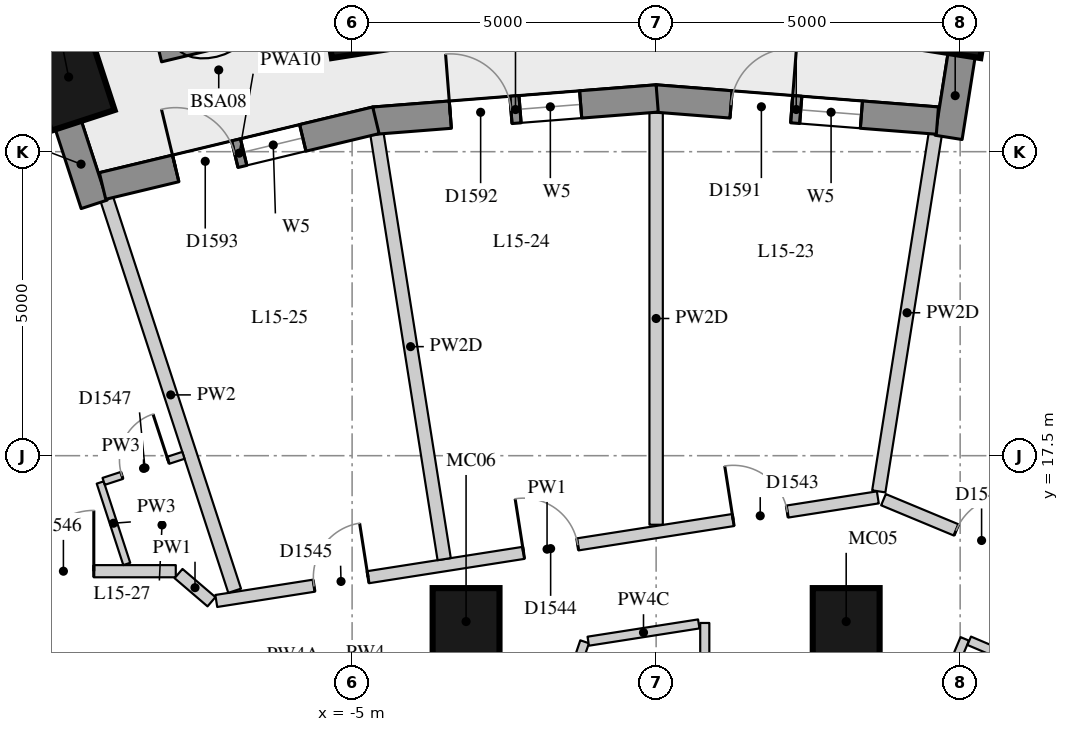
"""IFC4 building model, lengths in metres.
Left out: names, types, materials, properties, quantities, classifications, styles, units other than length and angle.
Written with IfcOpenShell. Run it as: python <this file> out.ifc"""

import sys

from ifc_helpers import new_model, si_unit, direction, frame, frame_2d, origin, origin_2d, place, context, subcontext, project, spatial, rectangle, extrude, element, fill, save


model = new_model("IFC4")
c1 = context("Model", 3, precision=1e-05, world=origin(), true_north=direction((0.0, 1.0)))
c2 = subcontext(c1, "Body", "Model", "MODEL_VIEW")
j1 = project(units=[si_unit("LENGTHUNIT", "METRE"), si_unit("PLANEANGLEUNIT", "RADIAN")], contexts=[c1])
p1 = place(None, origin())
s1 = spatial("IfcSite", under=j1, at=p1, CompositionType="ELEMENT")
p2 = place(p1, origin())
s2 = spatial("IfcBuilding", under=s1, at=p2, CompositionType="ELEMENT")
p3 = place(p2, frame((0.0, 0.0, 58.0)))
s3 = spatial("IfcBuildingStorey", under=s2, at=p3, CompositionType="ELEMENT", Elevation=58.0)
for number, where, z_axis, x_axis in (
    (1, (4.906, 24.866, 0.0), (0.0, 0.0, 1.0), (0.156, 0.988, 0.0)),
    (2, (-4.906, 24.866, 0.0), (0.0, 0.0, 1.0), (-0.156, 0.988, 0.0)),
    (3, (-9.662, 23.727, 0.0), (0.0, 0.0, 1.0), (-0.31, 0.951, 0.0)),
):
    element("IfcColumn", number, at=place(p3, frame(where, z_axis=z_axis, x_axis=x_axis)), inside=s3, PredefinedType="COLUMN", context=c2, shape_type="SweptSolid", body=[
        extrude(rectangle(XDim=1.5, YDim=1.1, at=origin_2d()), origin(), (0.0, 0.0, 1.0), 3.3),
    ])
for number, where, z_axis, x_axis in (
    (4, (3.126, 14.772, 0.0), (0.0, 0.0, 1.0), (1.0, 0.0, 0.0)),
    (5, (-3.126, 14.772, 0.0), (0.0, 0.0, 1.0), (1.0, 0.0, 0.0)),
):
    element("IfcColumn", number, at=place(p3, frame(where, z_axis=z_axis, x_axis=x_axis)), inside=s3, PredefinedType="COLUMN", context=c2, shape_type="SweptSolid", body=[
        extrude(rectangle(XDim=1.1, YDim=1.1, at=origin_2d()), origin(), (0.0, 0.0, 1.0), 3.3),
    ])
p4 = place(p3, frame((9.308, 24.35, 0.0), z_axis=(0.0, 0.0, 1.0), x_axis=(-0.972496561493, 0.232917233979, 0.0)))
e6 = element("IfcWall", 6, at=p4, inside=s3, PredefinedType="SOLIDWALL", context=c2, shape_type="SweptSolid", body=[
    extrude(rectangle(XDim=3.911, YDim=0.45, at=frame_2d((1.956, 0.0))), origin(), (0.0, 0.0, 1.0), 3.02),
])
p5 = place(p4, frame((0.855, 0.0, 0.4)))
e7 = element("IfcOpeningElement", 7, at=p5, cuts=e6, PredefinedType="OPENING", context=c2, shape_type="SweptSolid", body=[
    extrude(rectangle(XDim=2.2, YDim=1.75, at=frame_2d((1.1, 0.875))), frame((0.0, 0.235, 0.0), z_axis=(0.0, -1.0, 0.0), x_axis=(1.0, 0.0, 0.0)), (0.0, 0.0, 1.0), 0.47),
])
p6 = place(p3, frame((5.027, 24.108, 0.0), z_axis=(0.0, 0.0, 1.0), x_axis=(-0.156133927791, -0.98773589415, 0.0)))
e8 = element("IfcWall", 8, at=p6, inside=s3, PredefinedType="SOLIDWALL", context=c2, shape_type="SweptSolid", body=[
    extrude(rectangle(XDim=1.39, YDim=0.45, at=frame_2d((0.695, 0.0))), origin(), (0.0, 0.0, 1.0), 2.47),
])
p7 = place(p3, frame((-9.674, 22.956, 0.0), z_axis=(0.0, 0.0, 1.0), x_axis=(0.310269011655, -0.950648799719, 0.0)))
e9 = element("IfcWall", 9, at=p7, inside=s3, PredefinedType="SOLIDWALL", context=c2, shape_type="SweptSolid", body=[
    extrude(rectangle(XDim=1.39, YDim=0.45, at=frame_2d((0.695, 0.0))), origin(), (0.0, 0.0, 1.0), 3.02),
])
p8 = place(p3, frame((4.626, 23.011, 0.0), z_axis=(0.0, 0.0, 1.0), x_axis=(-0.996937095772, 0.078207589615, 0.0)))
e10 = element("IfcWall", 10, at=p8, inside=s3, PredefinedType="SOLIDWALL", context=c2, shape_type="SweptSolid", body=[
    extrude(rectangle(XDim=4.657, YDim=0.45, at=frame_2d((2.329, 0.0))), origin(), (0.0, 0.0, 1.0), 3.02),
])
p9 = place(p8, frame((1.254, 0.0, 0.4)))
e11 = element("IfcOpeningElement", 11, at=p9, cuts=e10, PredefinedType="OPENING", context=c2, shape_type="SweptSolid", body=[
    extrude(rectangle(XDim=1.0, YDim=1.75, at=frame_2d((0.5, 0.875))), frame((0.0, 0.235, 0.0), z_axis=(0.0, -1.0, 0.0), x_axis=(1.0, 0.0, 0.0)), (0.0, 0.0, 1.0), 0.47),
])
p10 = place(p8, frame((2.404, 0.0, 0.0)))
e12 = element("IfcOpeningElement", 12, at=p10, cuts=e10, PredefinedType="OPENING", context=c2, shape_type="SweptSolid", body=[
    extrude(rectangle(XDim=1.0, YDim=2.15, at=frame_2d((0.5, 1.075))), frame((0.0, 0.235, 0.0), z_axis=(0.0, -1.0, 0.0), x_axis=(1.0, 0.0, 0.0)), (0.0, 0.0, 1.0), 0.47),
])
p11 = place(p3, frame((0.018, 23.376, 0.0), z_axis=(0.0, 0.0, 1.0), x_axis=(-0.996935982964, -0.078221773648, 0.0)))
e13 = element("IfcWall", 13, at=p11, inside=s3, PredefinedType="SOLIDWALL", context=c2, shape_type="SweptSolid", body=[
    extrude(rectangle(XDim=4.676, YDim=0.45, at=frame_2d((2.338, 0.0))), origin(), (0.0, 0.0, 1.0), 3.02),
])
p12 = place(p11, frame((1.263, 0.0, 0.4)))
e14 = element("IfcOpeningElement", 14, at=p12, cuts=e13, PredefinedType="OPENING", context=c2, shape_type="SweptSolid", body=[
    extrude(rectangle(XDim=1.0, YDim=1.75, at=frame_2d((0.5, 0.875))), frame((0.0, 0.235, 0.0), z_axis=(0.0, -1.0, 0.0), x_axis=(1.0, 0.0, 0.0)), (0.0, 0.0, 1.0), 0.47),
])
p13 = place(p11, frame((2.413, 0.0, 0.0)))
e15 = element("IfcOpeningElement", 15, at=p13, cuts=e13, PredefinedType="OPENING", context=c2, shape_type="SweptSolid", body=[
    extrude(rectangle(XDim=1.0, YDim=2.15, at=frame_2d((0.5, 1.075))), frame((0.0, 0.235, 0.0), z_axis=(0.0, -1.0, 0.0), x_axis=(1.0, 0.0, 0.0)), (0.0, 0.0, 1.0), 0.47),
])
p14 = place(p3, frame((-4.608, 23.016, 0.0), z_axis=(0.0, 0.0, 1.0), x_axis=(-0.972343667289, -0.233554688847, 0.0)))
e16 = element("IfcWall", 16, at=p14, inside=s3, PredefinedType="SOLIDWALL", context=c2, shape_type="SweptSolid", body=[
    extrude(rectangle(XDim=4.624, YDim=0.45, at=frame_2d((2.312, 0.0))), origin(), (0.0, 0.0, 1.0), 3.02),
])
p15 = place(p14, frame((1.237, 0.0, 0.4)))
e17 = element("IfcOpeningElement", 17, at=p15, cuts=e16, PredefinedType="OPENING", context=c2, shape_type="SweptSolid", body=[
    extrude(rectangle(XDim=1.0, YDim=1.75, at=frame_2d((0.5, 0.875))), frame((0.0, 0.235, 0.0), z_axis=(0.0, -1.0, 0.0), x_axis=(1.0, 0.0, 0.0)), (0.0, 0.0, 1.0), 0.47),
])
p16 = place(p14, frame((2.387, 0.0, 0.0)))
e18 = element("IfcOpeningElement", 18, at=p16, cuts=e16, PredefinedType="OPENING", context=c2, shape_type="SweptSolid", body=[
    extrude(rectangle(XDim=1.0, YDim=2.15, at=frame_2d((0.5, 1.075))), frame((0.0, 0.235, 0.0), z_axis=(0.0, -1.0, 0.0), x_axis=(1.0, 0.0, 0.0)), (0.0, 0.0, 1.0), 0.47),
])
p17 = place(p3, frame((-6.465, 24.737, 0.0), z_axis=(0.0, 0.0, 1.0), x_axis=(-0.972504142103, -0.232885580473, 0.0)))
e19 = element("IfcWall", 19, at=p17, inside=s3, PredefinedType="USERDEFINED", context=c2, shape_type="SweptSolid", body=[
    extrude(rectangle(XDim=1.8, YDim=0.7, at=frame_2d((0.9, 0.0))), origin(), (0.0, 0.0, 1.0), 0.75),
])
p18 = place(p3, frame((-15.531, 15.6, 0.0), z_axis=(0.0, 0.0, 1.0), x_axis=(1.0, 0.0, 0.0)))
e20 = element("IfcWall", 20, at=p18, inside=s3, PredefinedType="PARTITIONING", context=c2, shape_type="SweptSolid", body=[
    extrude(rectangle(XDim=7.632, YDim=0.2, at=frame_2d((3.816, 0.0))), origin(), (0.0, 0.0, 1.0), 3.02),
])
p19 = place(p18, frame((5.283, 0.0, 0.0)))
e21 = element("IfcOpeningElement", 21, at=p19, cuts=e20, PredefinedType="OPENING", context=c2, shape_type="SweptSolid", body=[
    extrude(rectangle(XDim=1.0, YDim=2.1, at=frame_2d((0.5, 1.05))), frame((0.0, 0.11, 0.0), z_axis=(0.0, -1.0, 0.0), x_axis=(1.0, 0.0, 0.0)), (0.0, 0.0, 1.0), 0.22),
])
p20 = place(p18, frame((0.451, 0.0, 0.0)))
e22 = element("IfcOpeningElement", 22, at=p20, cuts=e20, PredefinedType="OPENING", context=c2, shape_type="SweptSolid", body=[
    extrude(rectangle(XDim=1.1, YDim=2.1, at=frame_2d((0.55, 1.05))), frame((0.0, 0.11, 0.0), z_axis=(0.0, -1.0, 0.0), x_axis=(1.0, 0.0, 0.0)), (0.0, 0.0, 1.0), 0.22),
])
p21 = place(p3, frame((-7.854, 15.561, 0.0), z_axis=(0.0, 0.0, 1.0), x_axis=(0.759763914627, -0.650199041856, 0.0)))
e23 = element("IfcWall", 23, at=p21, inside=s3, PredefinedType="PARTITIONING", context=c2, shape_type="SweptSolid", body=[
    extrude(rectangle(XDim=0.713, YDim=0.2, at=frame_2d((0.356, 0.0))), origin(), (0.0, 0.0, 1.0), 3.02),
])
p22 = place(p3, frame((-7.234, 15.11, 0.0), z_axis=(0.0, 0.0, 1.0), x_axis=(0.987957763282, 0.154723811906, 0.0)))
e24 = element("IfcWall", 24, at=p22, inside=s3, PredefinedType="PARTITIONING", context=c2, shape_type="SweptSolid", body=[
    extrude(rectangle(XDim=11.012, YDim=0.2, at=frame_2d((5.506, 0.0))), origin(), (0.0, 0.0, 1.0), 3.02),
])
p23 = place(p22, frame((8.605, 0.0, 0.0)))
e25 = element("IfcOpeningElement", 25, at=p23, cuts=e24, PredefinedType="OPENING", context=c2, shape_type="SweptSolid", body=[
    extrude(rectangle(XDim=0.9, YDim=2.1, at=frame_2d((0.45, 1.05))), frame((0.0, 0.11, 0.0), z_axis=(0.0, -1.0, 0.0), x_axis=(1.0, 0.0, 0.0)), (0.0, 0.0, 1.0), 0.22),
])
p24 = place(p22, frame((5.116, 0.0, 0.0)))
e26 = element("IfcOpeningElement", 26, at=p24, cuts=e24, PredefinedType="OPENING", context=c2, shape_type="SweptSolid", body=[
    extrude(rectangle(XDim=0.9, YDim=2.1, at=frame_2d((0.45, 1.05))), frame((0.0, 0.11, 0.0), z_axis=(0.0, -1.0, 0.0), x_axis=(1.0, 0.0, 0.0)), (0.0, 0.0, 1.0), 0.22),
])
p25 = place(p22, frame((1.626, 0.0, 0.0)))
e27 = element("IfcOpeningElement", 27, at=p25, cuts=e24, PredefinedType="OPENING", context=c2, shape_type="SweptSolid", body=[
    extrude(rectangle(XDim=0.9, YDim=2.1, at=frame_2d((0.45, 1.05))), frame((0.0, 0.11, 0.0), z_axis=(0.0, -1.0, 0.0), x_axis=(1.0, 0.0, 0.0)), (0.0, 0.0, 1.0), 0.22),
])
p26 = place(p3, frame((3.739, 16.776, 0.0), z_axis=(0.0, 0.0, 1.0), x_axis=(0.923364778497, -0.383923802117, 0.0)))
e28 = element("IfcWall", 28, at=p26, inside=s3, PredefinedType="PARTITIONING", context=c2, shape_type="SweptSolid", body=[
    extrude(rectangle(XDim=8.273, YDim=0.2, at=frame_2d((4.137, 0.0))), origin(), (0.0, 0.0, 1.0), 3.02),
])
p27 = place(p26, frame((6.153, 0.0, 0.0)))
e29 = element("IfcOpeningElement", 29, at=p27, cuts=e28, PredefinedType="OPENING", context=c2, shape_type="SweptSolid", body=[
    extrude(rectangle(XDim=1.1, YDim=2.1, at=frame_2d((0.55, 1.05))), frame((0.0, 0.11, 0.0), z_axis=(0.0, -1.0, 0.0), x_axis=(1.0, 0.0, 0.0)), (0.0, 0.0, 1.0), 0.22),
])
p28 = place(p26, frame((1.298, 0.0, 0.0)))
e30 = element("IfcOpeningElement", 30, at=p28, cuts=e28, PredefinedType="OPENING", context=c2, shape_type="SweptSolid", body=[
    extrude(rectangle(XDim=0.9, YDim=2.1, at=frame_2d((0.45, 1.05))), frame((0.0, 0.11, 0.0), z_axis=(0.0, -1.0, 0.0), x_axis=(1.0, 0.0, 0.0)), (0.0, 0.0, 1.0), 0.22),
])
p29 = place(p3, frame((0.8, 14.749, 0.0), z_axis=(0.0, 0.0, 1.0), x_axis=(0.0, -1.0, 0.0)))
e31 = element("IfcWall", 31, at=p29, inside=s3, PredefinedType="PARTITIONING", context=c2, shape_type="SweptSolid", body=[
    extrude(rectangle(XDim=5.599, YDim=0.15, at=frame_2d((2.799, 0.0))), origin(), (0.0, 0.0, 1.0), 3.02),
])
p30 = place(p3, frame((-1.567, 13.289, 0.0), z_axis=(0.0, 0.0, 1.0), x_axis=(0.321769415776, 0.946818062286, 0.0)))
e32 = element("IfcWall", 32, at=p30, inside=s3, PredefinedType="PARTITIONING", context=c2, shape_type="SweptSolid", body=[
    extrude(rectangle(XDim=1.215, YDim=0.15, at=frame_2d((0.607, 0.0))), origin(), (0.0, 0.0, 1.0), 3.02),
])
p31 = place(p3, frame((-1.116, 14.449, 0.0), z_axis=(0.0, 0.0, 1.0), x_axis=(0.988017726025, 0.154340445315, 0.0)))
e33 = element("IfcWall", 33, at=p31, inside=s3, PredefinedType="PARTITIONING", context=c2, shape_type="SweptSolid", body=[
    extrude(rectangle(XDim=1.84, YDim=0.15, at=frame_2d((0.92, 0.0))), origin(), (0.0, 0.0, 1.0), 2.42),
])
p32 = place(p3, frame((4.337, 12.724, 0.0), z_axis=(0.0, 0.0, 1.0), x_axis=(0.386537433901, 0.922273718694, 0.0)))
e34 = element("IfcWall", 34, at=p32, inside=s3, PredefinedType="PARTITIONING", context=c2, shape_type="SweptSolid", body=[
    extrude(rectangle(XDim=1.911, YDim=0.15, at=frame_2d((0.956, 0.0))), origin(), (0.0, 0.0, 1.0), 3.02),
])
p33 = place(p3, frame((5.149, 14.456, 0.0), z_axis=(0.0, 0.0, 1.0), x_axis=(0.920541383735, -0.390645057348, 0.0)))
e35 = element("IfcWall", 35, at=p33, inside=s3, PredefinedType="PARTITIONING", context=c2, shape_type="SweptSolid", body=[
    extrude(rectangle(XDim=6.124, YDim=0.15, at=frame_2d((3.062, 0.0))), origin(), (0.0, 0.0, 1.0), 3.02),
])
p34 = place(p33, frame((2.508, 0.0, 0.0)))
e36 = element("IfcOpeningElement", 36, at=p34, cuts=e35, PredefinedType="OPENING", context=c2, shape_type="SweptSolid", body=[
    extrude(rectangle(XDim=0.9, YDim=2.1, at=frame_2d((0.45, 1.05))), frame((0.0, 0.085, 0.0), z_axis=(0.0, -1.0, 0.0), x_axis=(1.0, 0.0, 0.0)), (0.0, 0.0, 1.0), 0.17),
])
p35 = place(p3, frame((4.591, 22.789, 0.0), z_axis=(0.0, 0.0, 1.0), x_axis=(-0.156126964527, -0.987736994826, 0.0)))
e37 = element("IfcWall", 37, at=p35, inside=s3, PredefinedType="PARTITIONING", context=c2, shape_type="SweptSolid", body=[
    extrude(rectangle(XDim=5.948, YDim=0.22, at=frame_2d((2.974, 0.0))), origin(), (0.0, 0.0, 1.0), 2.47),
])
p36 = place(p3, frame((0.0, 23.149, 0.0), z_axis=(0.0, 0.0, 1.0), x_axis=(0.0, -1.0, 0.0)))
e38 = element("IfcWall", 38, at=p36, inside=s3, PredefinedType="PARTITIONING", context=c2, shape_type="SweptSolid", body=[
    extrude(rectangle(XDim=6.784, YDim=0.22, at=frame_2d((3.392, 0.0))), origin(), (0.0, 0.0, 1.0), 2.47),
])
p37 = place(p3, frame((-4.591, 22.789, 0.0), z_axis=(0.0, 0.0, 1.0), x_axis=(0.15613617795, -0.987735538459, 0.0)))
e39 = element("IfcWall", 39, at=p37, inside=s3, PredefinedType="PARTITIONING", context=c2, shape_type="SweptSolid", body=[
    extrude(rectangle(XDim=7.077, YDim=0.22, at=frame_2d((3.539, 0.0))), origin(), (0.0, 0.0, 1.0), 2.47),
])
p38 = place(p3, frame((-9.034, 21.721, 0.0), z_axis=(0.0, 0.0, 1.0), x_axis=(0.310212430052, -0.950667264736, 0.0)))
e40 = element("IfcWall", 40, at=p38, inside=s3, PredefinedType="PARTITIONING", context=c2, shape_type="SweptSolid", body=[
    extrude(rectangle(XDim=6.777, YDim=0.22, at=frame_2d((3.388, 0.0))), origin(), (0.0, 0.0, 1.0), 3.02),
])
p39 = place(p3, frame((-8.706, 15.719, 0.0), z_axis=(0.0, 0.0, 1.0), x_axis=(-0.310245242974, 0.950656556918, 0.0)))
e41 = element("IfcWall", 41, at=p39, inside=s3, PredefinedType="PARTITIONING", context=c2, shape_type="SweptSolid", body=[
    extrude(rectangle(XDim=1.409, YDim=0.12, at=frame_2d((0.705, 0.0))), origin(), (0.0, 0.0, 1.0), 3.02),
])
p40 = place(p3, frame((-9.086, 17.077, 0.0), z_axis=(0.0, 0.0, 1.0), x_axis=(0.950576687533, 0.310489872812, 0.0)))
e42 = element("IfcWall", 42, at=p40, inside=s3, PredefinedType="PARTITIONING", context=c2, shape_type="SweptSolid", body=[
    extrude(rectangle(XDim=1.38, YDim=0.12, at=frame_2d((0.69, 0.0))), origin(), (0.0, 0.0, 1.0), 3.02),
])
p41 = place(p40, frame((0.315, 0.0, 0.0)))
e43 = element("IfcOpeningElement", 43, at=p41, cuts=e42, PredefinedType="OPENING", context=c2, shape_type="SweptSolid", body=[
    extrude(rectangle(XDim=0.8, YDim=2.1, at=frame_2d((0.4, 1.05))), frame((0.0, 0.07, 0.0), z_axis=(0.0, -1.0, 0.0), x_axis=(1.0, 0.0, 0.0)), (0.0, 0.0, 1.0), 0.14),
])
p42 = place(p9, origin())
e44 = element("IfcWindow", 44, at=p42, inside=s3, PartitioningType="SINGLE_PANEL", PredefinedType="WINDOW", context=c2, shape_type="SweptSolid", body=[
    extrude(rectangle(XDim=1.0, YDim=1.75, at=frame_2d((0.5, 0.875))), frame((0.0, 0.035, 0.0), z_axis=(0.0, -1.0, 0.0), x_axis=(1.0, 0.0, 0.0)), (0.0, 0.0, 1.0), 0.06),
])
fill(e11, e44)
p43 = place(p10, frame((1.0, 0.0, 0.0), z_axis=(0.0, 0.0, 1.0), x_axis=(-1.0, 0.0, 0.0)))
e45 = element("IfcDoor", 45, at=p43, inside=s3, OperationType="SINGLE_SWING_RIGHT", PredefinedType="DOOR", context=c2, shape_type="SweptSolid", body=[
    extrude(rectangle(XDim=1.0, YDim=2.15, at=frame_2d((0.5, 1.075))), frame((0.0, 0.075, 0.0), z_axis=(0.0, -1.0, 0.0), x_axis=(1.0, 0.0, 0.0)), (0.0, 0.0, 1.0), 0.05),
])
fill(e12, e45)
p44 = place(p12, origin())
e46 = element("IfcWindow", 46, at=p44, inside=s3, PartitioningType="SINGLE_PANEL", PredefinedType="WINDOW", context=c2, shape_type="SweptSolid", body=[
    extrude(rectangle(XDim=1.0, YDim=1.75, at=frame_2d((0.5, 0.875))), frame((0.0, 0.035, 0.0), z_axis=(0.0, -1.0, 0.0), x_axis=(1.0, 0.0, 0.0)), (0.0, 0.0, 1.0), 0.06),
])
fill(e14, e46)
p45 = place(p13, frame((1.0, 0.0, 0.0), z_axis=(0.0, 0.0, 1.0), x_axis=(-1.0, 0.0, 0.0)))
e47 = element("IfcDoor", 47, at=p45, inside=s3, OperationType="SINGLE_SWING_LEFT", PredefinedType="DOOR", context=c2, shape_type="SweptSolid", body=[
    extrude(rectangle(XDim=1.0, YDim=2.15, at=frame_2d((0.5, 1.075))), frame((0.0, 0.075, 0.0), z_axis=(0.0, -1.0, 0.0), x_axis=(1.0, 0.0, 0.0)), (0.0, 0.0, 1.0), 0.05),
])
fill(e15, e47)
p46 = place(p15, origin())
e48 = element("IfcWindow", 48, at=p46, inside=s3, PartitioningType="SINGLE_PANEL", PredefinedType="WINDOW", context=c2, shape_type="SweptSolid", body=[
    extrude(rectangle(XDim=1.0, YDim=1.75, at=frame_2d((0.5, 0.875))), frame((0.0, 0.035, 0.0), z_axis=(0.0, -1.0, 0.0), x_axis=(1.0, 0.0, 0.0)), (0.0, 0.0, 1.0), 0.06),
])
fill(e17, e48)
p47 = place(p16, frame((1.0, 0.0, 0.0), z_axis=(0.0, 0.0, 1.0), x_axis=(-1.0, 0.0, 0.0)))
e49 = element("IfcDoor", 49, at=p47, inside=s3, OperationType="SINGLE_SWING_LEFT", PredefinedType="DOOR", context=c2, shape_type="SweptSolid", body=[
    extrude(rectangle(XDim=1.0, YDim=2.15, at=frame_2d((0.5, 1.075))), frame((0.0, 0.075, 0.0), z_axis=(0.0, -1.0, 0.0), x_axis=(1.0, 0.0, 0.0)), (0.0, 0.0, 1.0), 0.05),
])
fill(e18, e49)
p48 = place(p28, origin())
e50 = element("IfcDoor", 50, at=p48, inside=s3, OperationType="SINGLE_SWING_RIGHT", PredefinedType="DOOR", context=c2, shape_type="SweptSolid", body=[
    extrude(rectangle(XDim=0.9, YDim=2.1, at=frame_2d((0.45, 1.05))), frame((0.0, 0.025, 0.0), z_axis=(0.0, -1.0, 0.0), x_axis=(1.0, 0.0, 0.0)), (0.0, 0.0, 1.0), 0.05),
])
fill(e30, e50)
p49 = place(p23, origin())
e51 = element("IfcDoor", 51, at=p49, inside=s3, OperationType="SINGLE_SWING_LEFT", PredefinedType="DOOR", context=c2, shape_type="SweptSolid", body=[
    extrude(rectangle(XDim=0.9, YDim=2.1, at=frame_2d((0.45, 1.05))), frame((0.0, 0.025, 0.0), z_axis=(0.0, -1.0, 0.0), x_axis=(1.0, 0.0, 0.0)), (0.0, 0.0, 1.0), 0.05),
])
fill(e25, e51)
p50 = place(p24, origin())
e52 = element("IfcDoor", 52, at=p50, inside=s3, OperationType="SINGLE_SWING_LEFT", PredefinedType="DOOR", context=c2, shape_type="SweptSolid", body=[
    extrude(rectangle(XDim=0.9, YDim=2.1, at=frame_2d((0.45, 1.05))), frame((0.0, 0.025, 0.0), z_axis=(0.0, -1.0, 0.0), x_axis=(1.0, 0.0, 0.0)), (0.0, 0.0, 1.0), 0.05),
])
fill(e26, e52)
p51 = place(p25, origin())
e53 = element("IfcDoor", 53, at=p51, inside=s3, OperationType="SINGLE_SWING_RIGHT", PredefinedType="DOOR", context=c2, shape_type="SweptSolid", body=[
    extrude(rectangle(XDim=0.9, YDim=2.1, at=frame_2d((0.45, 1.05))), frame((0.0, 0.025, 0.0), z_axis=(0.0, -1.0, 0.0), x_axis=(1.0, 0.0, 0.0)), (0.0, 0.0, 1.0), 0.05),
])
fill(e27, e53)
p52 = place(p19, origin())
e54 = element("IfcDoor", 54, at=p52, inside=s3, OperationType="SINGLE_SWING_RIGHT", PredefinedType="DOOR", context=c2, shape_type="SweptSolid", body=[
    extrude(rectangle(XDim=1.0, YDim=2.1, at=frame_2d((0.5, 1.05))), frame((0.0, 0.025, 0.0), z_axis=(0.0, -1.0, 0.0), x_axis=(1.0, 0.0, 0.0)), (0.0, 0.0, 1.0), 0.05),
])
fill(e21, e54)
p53 = place(p41, origin())
e55 = element("IfcDoor", 55, at=p53, inside=s3, OperationType="SINGLE_SWING_RIGHT", PredefinedType="DOOR", context=c2, shape_type="SweptSolid", body=[
    extrude(rectangle(XDim=0.8, YDim=2.1, at=frame_2d((0.4, 1.05))), frame((0.0, 0.025, 0.0), z_axis=(0.0, -1.0, 0.0), x_axis=(1.0, 0.0, 0.0)), (0.0, 0.0, 1.0), 0.05),
])
fill(e43, e55)
save(model, sys.argv[1])
